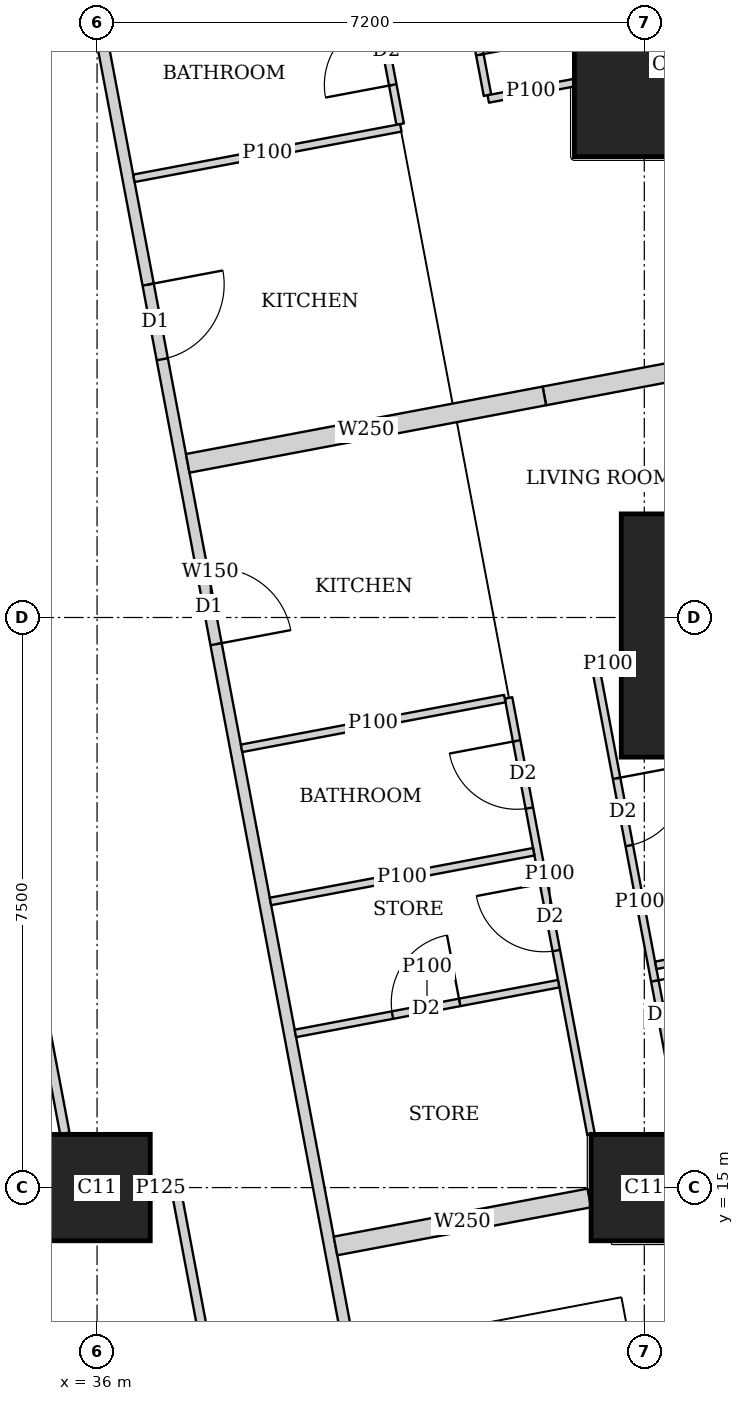
"""IFC4 building model, lengths in metres.
Left out: names, types, materials, properties, quantities, classifications, styles, units other than length and angle.
Written with IfcOpenShell. Run it as: python <this file> out.ifc"""

import sys

from ifc_helpers import new_model, si_unit, direction, frame, frame_2d, origin, origin_2d, place, context, subcontext, project, spatial, rectangle, extrude, element, fill, save


model = new_model("IFC4")
c1 = context("Model", 3, precision=1e-05, world=origin(), true_north=direction((0.0, 1.0)))
c2 = subcontext(c1, "Body", "Model", "MODEL_VIEW")
j1 = project(units=[si_unit("LENGTHUNIT", "METRE"), si_unit("PLANEANGLEUNIT", "RADIAN")], contexts=[c1])
p1 = place(None, origin())
s1 = spatial("IfcSite", under=j1, at=p1, CompositionType="ELEMENT")
p2 = place(p1, origin())
s2 = spatial("IfcBuilding", under=s1, at=p2, CompositionType="ELEMENT")
p3 = place(p2, frame((0.0, 0.0, 223.7)))
s3 = spatial("IfcBuildingStorey", under=s2, at=p3, CompositionType="ELEMENT", Elevation=223.7)
for number, where, z_axis, x_axis in (
    (1, (36.0, 15.0, 0.0), (0.0, 0.0, 1.0), (1.0, 0.0, 0.0)),
    (2, (43.2, 15.0, 0.0), (0.0, 0.0, 1.0), (1.0, 0.0, 0.0)),
):
    element("IfcColumn", number, at=place(p3, frame(where, z_axis=z_axis, x_axis=x_axis)), inside=s3, PredefinedType="COLUMN", context=c2, shape_type="SweptSolid", body=[
        extrude(rectangle(XDim=1.4, YDim=1.4, at=origin_2d()), origin(), (0.0, 0.0, 1.0), 3.75),
    ])
p4 = place(p3, frame((44.697, 22.263, 0.0), z_axis=(0.0, 0.0, 1.0), x_axis=(1.0, 0.0, 0.0)))
e3 = element("IfcColumn", 3, at=p4, inside=s3, PredefinedType="COLUMN", context=c2, shape_type="SweptSolid", body=[
    extrude(rectangle(XDim=3.6, YDim=3.2, at=origin_2d()), origin(), (0.0, 0.0, 1.0), 3.75),
])
p5 = place(p3, frame((43.48, 29.763, 0.0), z_axis=(0.0, 0.0, 1.0), x_axis=(1.0, 0.0, 0.0)))
e4 = element("IfcColumn", 4, at=p5, inside=s3, PredefinedType="COLUMN", context=c2, shape_type="SweptSolid", body=[
    extrude(rectangle(XDim=2.4, YDim=2.4, at=origin_2d()), origin(), (0.0, 0.0, 1.0), 3.75),
])
p6 = place(p3, frame((50.653, 2.703, 0.0), z_axis=(0.0, 0.0, 1.0), x_axis=(-0.185612026696, 0.982623109613, 0.0)))
e5 = element("IfcWall", 5, at=p6, inside=s3, PredefinedType="SOLIDWALL", context=c2, shape_type="SweptSolid", body=[
    extrude(rectangle(XDim=41.393, YDim=0.2, at=frame_2d((20.697, 0.0))), origin(), (0.0, 0.0, 1.0), 3.5),
])
p7 = place(p6, frame((1.633, 0.0, 0.9)))
e6 = element("IfcOpeningElement", 6, at=p7, cuts=e5, PredefinedType="OPENING", context=c2, shape_type="SweptSolid", body=[
    extrude(rectangle(XDim=1.8, YDim=1.5, at=frame_2d((0.9, 0.75))), frame((0.0, 0.11, 0.0), z_axis=(0.0, -1.0, 0.0), x_axis=(1.0, 0.0, 0.0)), (0.0, 0.0, 1.0), 0.22),
])
p8 = place(p6, frame((6.032, 0.0, 0.9)))
e7 = element("IfcOpeningElement", 7, at=p8, cuts=e5, PredefinedType="OPENING", context=c2, shape_type="SweptSolid", body=[
    extrude(rectangle(XDim=1.8, YDim=1.5, at=frame_2d((0.9, 0.75))), frame((0.0, 0.11, 0.0), z_axis=(0.0, -1.0, 0.0), x_axis=(1.0, 0.0, 0.0)), (0.0, 0.0, 1.0), 0.22),
])
p9 = place(p6, frame((9.848, 0.0, 0.9)))
e8 = element("IfcOpeningElement", 8, at=p9, cuts=e5, PredefinedType="OPENING", context=c2, shape_type="SweptSolid", body=[
    extrude(rectangle(XDim=1.8, YDim=1.5, at=frame_2d((0.9, 0.75))), frame((0.0, 0.11, 0.0), z_axis=(0.0, -1.0, 0.0), x_axis=(1.0, 0.0, 0.0)), (0.0, 0.0, 1.0), 0.22),
])
p10 = place(p6, frame((13.664, 0.0, 0.9)))
e9 = element("IfcOpeningElement", 9, at=p10, cuts=e5, PredefinedType="OPENING", context=c2, shape_type="SweptSolid", body=[
    extrude(rectangle(XDim=1.8, YDim=1.5, at=frame_2d((0.9, 0.75))), frame((0.0, 0.11, 0.0), z_axis=(0.0, -1.0, 0.0), x_axis=(1.0, 0.0, 0.0)), (0.0, 0.0, 1.0), 0.22),
])
p11 = place(p6, frame((17.481, 0.0, 0.9)))
e10 = element("IfcOpeningElement", 10, at=p11, cuts=e5, PredefinedType="OPENING", context=c2, shape_type="SweptSolid", body=[
    extrude(rectangle(XDim=1.8, YDim=1.5, at=frame_2d((0.9, 0.75))), frame((0.0, 0.11, 0.0), z_axis=(0.0, -1.0, 0.0), x_axis=(1.0, 0.0, 0.0)), (0.0, 0.0, 1.0), 0.22),
])
p12 = place(p6, frame((21.297, 0.0, 0.9)))
e11 = element("IfcOpeningElement", 11, at=p12, cuts=e5, PredefinedType="OPENING", context=c2, shape_type="SweptSolid", body=[
    extrude(rectangle(XDim=1.8, YDim=1.5, at=frame_2d((0.9, 0.75))), frame((0.0, 0.11, 0.0), z_axis=(0.0, -1.0, 0.0), x_axis=(1.0, 0.0, 0.0)), (0.0, 0.0, 1.0), 0.22),
])
p13 = place(p6, frame((25.113, 0.0, 0.9)))
e12 = element("IfcOpeningElement", 12, at=p13, cuts=e5, PredefinedType="OPENING", context=c2, shape_type="SweptSolid", body=[
    extrude(rectangle(XDim=1.8, YDim=1.5, at=frame_2d((0.9, 0.75))), frame((0.0, 0.11, 0.0), z_axis=(0.0, -1.0, 0.0), x_axis=(1.0, 0.0, 0.0)), (0.0, 0.0, 1.0), 0.22),
])
p14 = place(p6, frame((28.93, 0.0, 0.9)))
e13 = element("IfcOpeningElement", 13, at=p14, cuts=e5, PredefinedType="OPENING", context=c2, shape_type="SweptSolid", body=[
    extrude(rectangle(XDim=1.8, YDim=1.5, at=frame_2d((0.9, 0.75))), frame((0.0, 0.11, 0.0), z_axis=(0.0, -1.0, 0.0), x_axis=(1.0, 0.0, 0.0)), (0.0, 0.0, 1.0), 0.22),
])
p15 = place(p6, frame((32.746, 0.0, 0.9)))
e14 = element("IfcOpeningElement", 14, at=p15, cuts=e5, PredefinedType="OPENING", context=c2, shape_type="SweptSolid", body=[
    extrude(rectangle(XDim=1.8, YDim=1.5, at=frame_2d((0.9, 0.75))), frame((0.0, 0.11, 0.0), z_axis=(0.0, -1.0, 0.0), x_axis=(1.0, 0.0, 0.0)), (0.0, 0.0, 1.0), 0.22),
])
p16 = place(p6, frame((36.481, 0.0, 0.9)))
e15 = element("IfcOpeningElement", 15, at=p16, cuts=e5, PredefinedType="OPENING", context=c2, shape_type="SweptSolid", body=[
    extrude(rectangle(XDim=1.8, YDim=1.5, at=frame_2d((0.9, 0.75))), frame((0.0, 0.11, 0.0), z_axis=(0.0, -1.0, 0.0), x_axis=(1.0, 0.0, 0.0)), (0.0, 0.0, 1.0), 0.22),
])
p17 = place(p3, frame((33.68, 42.723, 0.0), z_axis=(0.0, 0.0, 1.0), x_axis=(0.185601160014, -0.982625162207, 0.0)))
e16 = element("IfcWall", 16, at=p17, inside=s3, PredefinedType="SOLIDWALL", context=c2, shape_type="SweptSolid", body=[
    extrude(rectangle(XDim=41.051, YDim=0.15, at=frame_2d((20.526, 0.0))), origin(), (0.0, 0.0, 1.0), 2.5),
])
p18 = place(p17, frame((16.123, 0.0, 0.0)))
e17 = element("IfcOpeningElement", 17, at=p18, cuts=e16, PredefinedType="OPENING", context=c2, shape_type="SweptSolid", body=[
    extrude(rectangle(XDim=1.0, YDim=2.1, at=frame_2d((0.5, 1.05))), frame((0.0, 0.085, 0.0), z_axis=(0.0, -1.0, 0.0), x_axis=(1.0, 0.0, 0.0)), (0.0, 0.0, 1.0), 0.17),
])
p19 = place(p17, frame((19.938, 0.0, 0.0)))
e18 = element("IfcOpeningElement", 18, at=p19, cuts=e16, PredefinedType="OPENING", context=c2, shape_type="SweptSolid", body=[
    extrude(rectangle(XDim=1.0, YDim=2.1, at=frame_2d((0.5, 1.05))), frame((0.0, 0.085, 0.0), z_axis=(0.0, -1.0, 0.0), x_axis=(1.0, 0.0, 0.0)), (0.0, 0.0, 1.0), 0.17),
])
p20 = place(p17, frame((30.902, 0.0, 0.0)))
e19 = element("IfcOpeningElement", 19, at=p20, cuts=e16, PredefinedType="OPENING", context=c2, shape_type="SweptSolid", body=[
    extrude(rectangle(XDim=1.0, YDim=2.1, at=frame_2d((0.5, 1.05))), frame((0.0, 0.085, 0.0), z_axis=(0.0, -1.0, 0.0), x_axis=(1.0, 0.0, 0.0)), (0.0, 0.0, 1.0), 0.17),
])
p21 = place(p3, frame((38.764, 41.941, 0.0), z_axis=(0.0, 0.0, 1.0), x_axis=(0.185512176227, -0.982641965556, 0.0)))
e20 = element("IfcWall", 20, at=p21, inside=s3, PredefinedType="PARTITIONING", context=c2, shape_type="SweptSolid", body=[
    extrude(rectangle(XDim=12.792, YDim=0.1, at=frame_2d((6.396, 0.0))), origin(), (0.0, 0.0, 1.0), 2.5),
])
p22 = place(p21, frame((11.35, 0.0, 0.0)))
e21 = element("IfcOpeningElement", 21, at=p22, cuts=e20, PredefinedType="OPENING", context=c2, shape_type="SweptSolid", body=[
    extrude(rectangle(XDim=0.9, YDim=2.1, at=frame_2d((0.45, 1.05))), frame((0.0, 0.06, 0.0), z_axis=(0.0, -1.0, 0.0), x_axis=(1.0, 0.0, 0.0)), (0.0, 0.0, 1.0), 0.12),
])
p23 = place(p21, frame((8.085, 0.0, 0.0)))
e22 = element("IfcOpeningElement", 22, at=p23, cuts=e20, PredefinedType="OPENING", context=c2, shape_type="SweptSolid", body=[
    extrude(rectangle(XDim=0.9, YDim=2.1, at=frame_2d((0.45, 1.05))), frame((0.0, 0.06, 0.0), z_axis=(0.0, -1.0, 0.0), x_axis=(1.0, 0.0, 0.0)), (0.0, 0.0, 1.0), 0.12),
])
p24 = place(p21, frame((3.7, 0.0, 0.0)))
e23 = element("IfcOpeningElement", 23, at=p24, cuts=e20, PredefinedType="OPENING", context=c2, shape_type="SweptSolid", body=[
    extrude(rectangle(XDim=0.9, YDim=2.1, at=frame_2d((0.45, 1.05))), frame((0.0, 0.06, 0.0), z_axis=(0.0, -1.0, 0.0), x_axis=(1.0, 0.0, 0.0)), (0.0, 0.0, 1.0), 0.12),
])
p25 = place(p3, frame((37.473, 42.309, 0.0), z_axis=(0.0, 0.0, 1.0), x_axis=(0.185570636839, -0.982630927024, 0.0)))
e24 = element("IfcWall", 24, at=p25, inside=s3, PredefinedType="PARTITIONING", context=c2, shape_type="SweptSolid", body=[
    extrude(rectangle(XDim=13.553, YDim=0.1, at=frame_2d((6.777, 0.0))), origin(), (0.0, 0.0, 1.0), 2.5),
])
p26 = place(p25, frame((12.128, 0.0, 0.0)))
e25 = element("IfcOpeningElement", 25, at=p26, cuts=e24, PredefinedType="OPENING", context=c2, shape_type="SweptSolid", body=[
    extrude(rectangle(XDim=0.9, YDim=2.1, at=frame_2d((0.45, 1.05))), frame((0.0, 0.06, 0.0), z_axis=(0.0, -1.0, 0.0), x_axis=(1.0, 0.0, 0.0)), (0.0, 0.0, 1.0), 0.12),
])
p27 = place(p25, frame((8.487, 0.0, 0.0)))
e26 = element("IfcOpeningElement", 26, at=p27, cuts=e24, PredefinedType="OPENING", context=c2, shape_type="SweptSolid", body=[
    extrude(rectangle(XDim=0.9, YDim=2.1, at=frame_2d((0.45, 1.05))), frame((0.0, 0.06, 0.0), z_axis=(0.0, -1.0, 0.0), x_axis=(1.0, 0.0, 0.0)), (0.0, 0.0, 1.0), 0.12),
])
p28 = place(p25, frame((2.853, 0.0, 0.0)))
e27 = element("IfcOpeningElement", 27, at=p28, cuts=e24, PredefinedType="OPENING", context=c2, shape_type="SweptSolid", body=[
    extrude(rectangle(XDim=0.9, YDim=2.1, at=frame_2d((0.45, 1.05))), frame((0.0, 0.06, 0.0), z_axis=(0.0, -1.0, 0.0), x_axis=(1.0, 0.0, 0.0)), (0.0, 0.0, 1.0), 0.12),
])
p29 = place(p25, frame((10.22, 0.0, 0.0)))
e28 = element("IfcOpeningElement", 28, at=p29, cuts=e24, PredefinedType="OPENING", context=c2, shape_type="SweptSolid", body=[
    extrude(rectangle(XDim=0.9, YDim=2.1, at=frame_2d((0.45, 1.05))), frame((0.0, 0.06, 0.0), z_axis=(0.0, -1.0, 0.0), x_axis=(1.0, 0.0, 0.0)), (0.0, 0.0, 1.0), 0.12),
])
p30 = place(p25, frame((5.819, 0.0, 0.0)))
e29 = element("IfcOpeningElement", 29, at=p30, cuts=e24, PredefinedType="OPENING", context=c2, shape_type="SweptSolid", body=[
    extrude(rectangle(XDim=0.9, YDim=2.1, at=frame_2d((0.45, 1.05))), frame((0.0, 0.06, 0.0), z_axis=(0.0, -1.0, 0.0), x_axis=(1.0, 0.0, 0.0)), (0.0, 0.0, 1.0), 0.12),
])
p31 = place(p3, frame((42.27, 29.535, 0.0), z_axis=(0.0, 0.0, 1.0), x_axis=(-0.982502700549, -0.186248338017, 0.0)))
e30 = element("IfcWall", 30, at=p31, inside=s3, PredefinedType="PARTITIONING", context=c2, shape_type="SweptSolid", body=[
    extrude(rectangle(XDim=1.143, YDim=0.1, at=frame_2d((0.572, 0.0))), origin(), (0.0, 0.0, 1.0), 2.5),
])
p32 = place(p3, frame((39.997, 28.942, 0.0), z_axis=(0.0, 0.0, 1.0), x_axis=(-0.982613029841, -0.185665380691, 0.0)))
e31 = element("IfcWall", 31, at=p32, inside=s3, PredefinedType="PARTITIONING", context=c2, shape_type="SweptSolid", body=[
    extrude(rectangle(XDim=3.575, YDim=0.1, at=frame_2d((1.788, 0.0))), origin(), (0.0, 0.0, 1.0), 3.5),
])
p33 = place(p3, frame((42.566, 21.809, 0.0), z_axis=(0.0, 0.0, 1.0), x_axis=(0.185613526435, -0.98262282632, 0.0)))
e32 = element("IfcWall", 32, at=p33, inside=s3, PredefinedType="PARTITIONING", context=c2, shape_type="SweptSolid", body=[
    extrude(rectangle(XDim=6.207, YDim=0.1, at=frame_2d((3.104, 0.0))), origin(), (0.0, 0.0, 1.0), 2.5),
])
p34 = place(p33, frame((1.45, 0.0, 0.0)))
e33 = element("IfcOpeningElement", 33, at=p34, cuts=e32, PredefinedType="OPENING", context=c2, shape_type="SweptSolid", body=[
    extrude(rectangle(XDim=0.9, YDim=2.1, at=frame_2d((0.45, 1.05))), frame((0.0, 0.06, 0.0), z_axis=(0.0, -1.0, 0.0), x_axis=(1.0, 0.0, 0.0)), (0.0, 0.0, 1.0), 0.12),
])
p35 = place(p33, frame((4.163, 0.0, 0.0)))
e34 = element("IfcOpeningElement", 34, at=p35, cuts=e32, PredefinedType="OPENING", context=c2, shape_type="SweptSolid", body=[
    extrude(rectangle(XDim=0.9, YDim=2.1, at=frame_2d((0.45, 1.05))), frame((0.0, 0.06, 0.0), z_axis=(0.0, -1.0, 0.0), x_axis=(1.0, 0.0, 0.0)), (0.0, 0.0, 1.0), 0.12),
])
p36 = place(p3, frame((41.414, 21.442, 0.0), z_axis=(0.0, 0.0, 1.0), x_axis=(0.185698675093, -0.982606738257, 0.0)))
e35 = element("IfcWall", 35, at=p36, inside=s3, PredefinedType="PARTITIONING", context=c2, shape_type="SweptSolid", body=[
    extrude(rectangle(XDim=5.843, YDim=0.1, at=frame_2d((2.921, 0.0))), origin(), (0.0, 0.0, 1.0), 3.5),
])
p37 = place(p36, frame((0.575, 0.0, 0.0)))
e36 = element("IfcOpeningElement", 36, at=p37, cuts=e35, PredefinedType="OPENING", context=c2, shape_type="SweptSolid", body=[
    extrude(rectangle(XDim=0.9, YDim=2.1, at=frame_2d((0.45, 1.05))), frame((0.0, 0.06, 0.0), z_axis=(0.0, -1.0, 0.0), x_axis=(1.0, 0.0, 0.0)), (0.0, 0.0, 1.0), 0.12),
])
p38 = place(p36, frame((2.483, 0.0, 0.0)))
e37 = element("IfcOpeningElement", 37, at=p38, cuts=e35, PredefinedType="OPENING", context=c2, shape_type="SweptSolid", body=[
    extrude(rectangle(XDim=0.9, YDim=2.1, at=frame_2d((0.45, 1.05))), frame((0.0, 0.06, 0.0), z_axis=(0.0, -1.0, 0.0), x_axis=(1.0, 0.0, 0.0)), (0.0, 0.0, 1.0), 0.12),
])
p39 = place(p3, frame((42.887, 21.921, 0.0), z_axis=(0.0, 0.0, 1.0), x_axis=(-0.982274918032, -0.187445953293, 0.0)))
e38 = element("IfcWall", 38, at=p39, inside=s3, PredefinedType="PARTITIONING", context=c2, shape_type="SweptSolid", body=[
    extrude(rectangle(XDim=0.336, YDim=0.1, at=frame_2d((0.168, 0.0))), origin(), (0.0, 0.0, 1.0), 2.5),
])
p40 = place(p3, frame((47.527, 18.712, 0.0), z_axis=(0.0, 0.0, 1.0), x_axis=(-0.982665405803, -0.185387972203, 0.0)))
e39 = element("IfcWall", 39, at=p40, inside=s3, PredefinedType="PARTITIONING", context=c2, shape_type="SweptSolid", body=[
    extrude(rectangle(XDim=4.25, YDim=0.1, at=frame_2d((2.125, 0.0))), origin(), (0.0, 0.0, 1.0), 2.05),
])
p41 = place(p3, frame((41.365, 21.433, 0.0), z_axis=(0.0, 0.0, 1.0), x_axis=(-0.982638553676, -0.185530247748, 0.0)))
e40 = element("IfcWall", 40, at=p41, inside=s3, PredefinedType="PARTITIONING", context=c2, shape_type="SweptSolid", body=[
    extrude(rectangle(XDim=3.525, YDim=0.1, at=frame_2d((1.763, 0.0))), origin(), (0.0, 0.0, 1.0), 3.5),
])
p42 = place(p3, frame((42.073, 17.682, 0.0), z_axis=(0.0, 0.0, 1.0), x_axis=(-0.98265117712, -0.185463376723, 0.0)))
e41 = element("IfcWall", 41, at=p42, inside=s3, PredefinedType="PARTITIONING", context=c2, shape_type="SweptSolid", body=[
    extrude(rectangle(XDim=3.525, YDim=0.1, at=frame_2d((1.763, 0.0))), origin(), (0.0, 0.0, 1.0), 3.5),
])
p43 = place(p42, frame((1.325, 0.0, 0.0)))
e42 = element("IfcOpeningElement", 42, at=p43, cuts=e41, PredefinedType="OPENING", context=c2, shape_type="SweptSolid", body=[
    extrude(rectangle(XDim=0.9, YDim=2.1, at=frame_2d((0.45, 1.05))), frame((0.0, 0.06, 0.0), z_axis=(0.0, -1.0, 0.0), x_axis=(1.0, 0.0, 0.0)), (0.0, 0.0, 1.0), 0.12),
])
p44 = place(p3, frame((41.745, 19.418, 0.0), z_axis=(0.0, 0.0, 1.0), x_axis=(-0.982638553676, -0.185530247748, 0.0)))
e43 = element("IfcWall", 43, at=p44, inside=s3, PredefinedType="PARTITIONING", context=c2, shape_type="SweptSolid", body=[
    extrude(rectangle(XDim=3.525, YDim=0.1, at=frame_2d((1.763, 0.0))), origin(), (0.0, 0.0, 1.0), 3.5),
])
p45 = place(p3, frame((46.11, 26.213, 0.0), z_axis=(0.0, 0.0, 1.0), x_axis=(-0.982633535512, -0.185556823879, 0.0)))
e44 = element("IfcWall", 44, at=p45, inside=s3, PredefinedType="SOLIDWALL", context=c2, shape_type="SweptSolid", body=[
    extrude(rectangle(XDim=4.3, YDim=0.25, at=frame_2d((2.15, 0.0))), origin(), (0.0, 0.0, 1.0), 2.05),
])
p46 = place(p3, frame((41.885, 25.415, 0.0), z_axis=(0.0, 0.0, 1.0), x_axis=(-0.982596737686, -0.185751584349, 0.0)))
e45 = element("IfcWall", 45, at=p46, inside=s3, PredefinedType="SOLIDWALL", context=c2, shape_type="SweptSolid", body=[
    extrude(rectangle(XDim=4.775, YDim=0.25, at=frame_2d((2.387, 0.0))), origin(), (0.0, 0.0, 1.0), 3.5),
])
p47 = place(p3, frame((42.476, 14.863, 0.0), z_axis=(0.0, 0.0, 1.0), x_axis=(-0.982603567712, -0.185715450942, 0.0)))
e46 = element("IfcWall", 46, at=p47, inside=s3, PredefinedType="SOLIDWALL", context=c2, shape_type="SweptSolid", body=[
    extrude(rectangle(XDim=3.398, YDim=0.25, at=frame_2d((1.699, 0.0))), origin(), (0.0, 0.0, 1.0), 3.5),
])
p48 = place(p3, frame((37.9, 10.413, 0.0), z_axis=(0.0, 0.0, 1.0), x_axis=(-0.185513629891, 0.982641691119, 0.0)))
e47 = element("IfcWall", 47, at=p48, inside=s3, PredefinedType="PARTITIONING", context=c2, shape_type="SweptSolid", body=[
    extrude(rectangle(XDim=4.668, YDim=0.125, at=frame_2d((2.334, 0.0))), origin(), (0.0, 0.0, 1.0), 3.5),
])
p49 = place(p48, frame((0.708, 0.0, 0.0)))
e48 = element("IfcOpeningElement", 48, at=p49, cuts=e47, PredefinedType="OPENING", context=c2, shape_type="SweptSolid", body=[
    extrude(rectangle(XDim=1.0, YDim=2.1, at=frame_2d((0.5, 1.05))), frame((0.0, 0.073, 0.0), z_axis=(0.0, -1.0, 0.0), x_axis=(1.0, 0.0, 0.0)), (0.0, 0.0, 1.0), 0.145),
])
p50 = place(p3, frame((35.576, 15.713, 0.0), z_axis=(0.0, 0.0, 1.0), x_axis=(-0.185602982696, 0.982624817931, 0.0)))
e49 = element("IfcWall", 49, at=p50, inside=s3, PredefinedType="PARTITIONING", context=c2, shape_type="SweptSolid", body=[
    extrude(rectangle(XDim=13.814, YDim=0.125, at=frame_2d((6.907, 0.0))), origin(), (0.0, 0.0, 1.0), 2.5),
])
p51 = place(p50, frame((5.3, 0.0, 0.0)))
e50 = element("IfcOpeningElement", 50, at=p51, cuts=e49, PredefinedType="OPENING", context=c2, shape_type="SweptSolid", body=[
    extrude(rectangle(XDim=1.0, YDim=2.1, at=frame_2d((0.5, 1.05))), frame((0.0, 0.073, 0.0), z_axis=(0.0, -1.0, 0.0), x_axis=(1.0, 0.0, 0.0)), (0.0, 0.0, 1.0), 0.145),
])
p52 = place(p3, frame((36.701, 15.0, 0.0), z_axis=(0.0, 0.0, 1.0), x_axis=(1.0, 0.0, 0.0)))
e51 = element("IfcWall", 51, at=p52, inside=s3, PredefinedType="PARTITIONING", context=c2, shape_type="SweptSolid", body=[
    extrude(rectangle(XDim=0.272, YDim=0.125, at=frame_2d((0.136, 0.0))), origin(), (0.0, 0.0, 1.0), 3.5),
])
p53 = place(p22, origin())
e52 = element("IfcDoor", 52, at=p53, inside=s3, OperationType="SINGLE_SWING_RIGHT", PredefinedType="DOOR", context=c2, shape_type="SweptSolid", body=[
    extrude(rectangle(XDim=0.9, YDim=2.1, at=frame_2d((0.45, 1.05))), frame((0.0, 0.025, 0.0), z_axis=(0.0, -1.0, 0.0), x_axis=(1.0, 0.0, 0.0)), (0.0, 0.0, 1.0), 0.05),
])
fill(e21, e52)
p54 = place(p26, origin())
e53 = element("IfcDoor", 53, at=p54, inside=s3, OperationType="SINGLE_SWING_LEFT", PredefinedType="DOOR", context=c2, shape_type="SweptSolid", body=[
    extrude(rectangle(XDim=0.9, YDim=2.1, at=frame_2d((0.45, 1.05))), frame((0.0, 0.025, 0.0), z_axis=(0.0, -1.0, 0.0), x_axis=(1.0, 0.0, 0.0)), (0.0, 0.0, 1.0), 0.05),
])
fill(e25, e53)
p55 = place(p18, origin())
e54 = element("IfcDoor", 54, at=p55, inside=s3, OperationType="SINGLE_SWING_LEFT", PredefinedType="DOOR", context=c2, shape_type="SweptSolid", body=[
    extrude(rectangle(XDim=1.0, YDim=2.1, at=frame_2d((0.5, 1.05))), frame((0.0, 0.025, 0.0), z_axis=(0.0, -1.0, 0.0), x_axis=(1.0, 0.0, 0.0)), (0.0, 0.0, 1.0), 0.05),
])
fill(e17, e54)
p56 = place(p34, origin())
e55 = element("IfcDoor", 55, at=p56, inside=s3, OperationType="SINGLE_SWING_LEFT", PredefinedType="DOOR", context=c2, shape_type="SweptSolid", body=[
    extrude(rectangle(XDim=0.9, YDim=2.1, at=frame_2d((0.45, 1.05))), frame((0.0, 0.025, 0.0), z_axis=(0.0, -1.0, 0.0), x_axis=(1.0, 0.0, 0.0)), (0.0, 0.0, 1.0), 0.05),
])
fill(e33, e55)
p57 = place(p35, origin())
e56 = element("IfcDoor", 56, at=p57, inside=s3, OperationType="SINGLE_SWING_LEFT", PredefinedType="DOOR", context=c2, shape_type="SweptSolid", body=[
    extrude(rectangle(XDim=0.9, YDim=2.1, at=frame_2d((0.45, 1.05))), frame((0.0, 0.025, 0.0), z_axis=(0.0, -1.0, 0.0), x_axis=(1.0, 0.0, 0.0)), (0.0, 0.0, 1.0), 0.05),
])
fill(e34, e56)
p58 = place(p37, origin())
e57 = element("IfcDoor", 57, at=p58, inside=s3, OperationType="SINGLE_SWING_RIGHT", PredefinedType="DOOR", context=c2, shape_type="SweptSolid", body=[
    extrude(rectangle(XDim=0.9, YDim=2.1, at=frame_2d((0.45, 1.05))), frame((0.0, 0.025, 0.0), z_axis=(0.0, -1.0, 0.0), x_axis=(1.0, 0.0, 0.0)), (0.0, 0.0, 1.0), 0.05),
])
fill(e36, e57)
p59 = place(p38, origin())
e58 = element("IfcDoor", 58, at=p59, inside=s3, OperationType="SINGLE_SWING_RIGHT", PredefinedType="DOOR", context=c2, shape_type="SweptSolid", body=[
    extrude(rectangle(XDim=0.9, YDim=2.1, at=frame_2d((0.45, 1.05))), frame((0.0, 0.025, 0.0), z_axis=(0.0, -1.0, 0.0), x_axis=(1.0, 0.0, 0.0)), (0.0, 0.0, 1.0), 0.05),
])
fill(e37, e58)
p60 = place(p19, origin())
e59 = element("IfcDoor", 59, at=p60, inside=s3, OperationType="SINGLE_SWING_RIGHT", PredefinedType="DOOR", context=c2, shape_type="SweptSolid", body=[
    extrude(rectangle(XDim=1.0, YDim=2.1, at=frame_2d((0.5, 1.05))), frame((0.0, 0.025, 0.0), z_axis=(0.0, -1.0, 0.0), x_axis=(1.0, 0.0, 0.0)), (0.0, 0.0, 1.0), 0.05),
])
fill(e18, e59)
p61 = place(p43, origin())
e60 = element("IfcDoor", 60, at=p61, inside=s3, OperationType="SINGLE_SWING_RIGHT", PredefinedType="DOOR", context=c2, shape_type="SweptSolid", body=[
    extrude(rectangle(XDim=0.9, YDim=2.1, at=frame_2d((0.45, 1.05))), frame((0.0, 0.025, 0.0), z_axis=(0.0, -1.0, 0.0), x_axis=(1.0, 0.0, 0.0)), (0.0, 0.0, 1.0), 0.05),
])
fill(e42, e60)
save(model, sys.argv[1])
